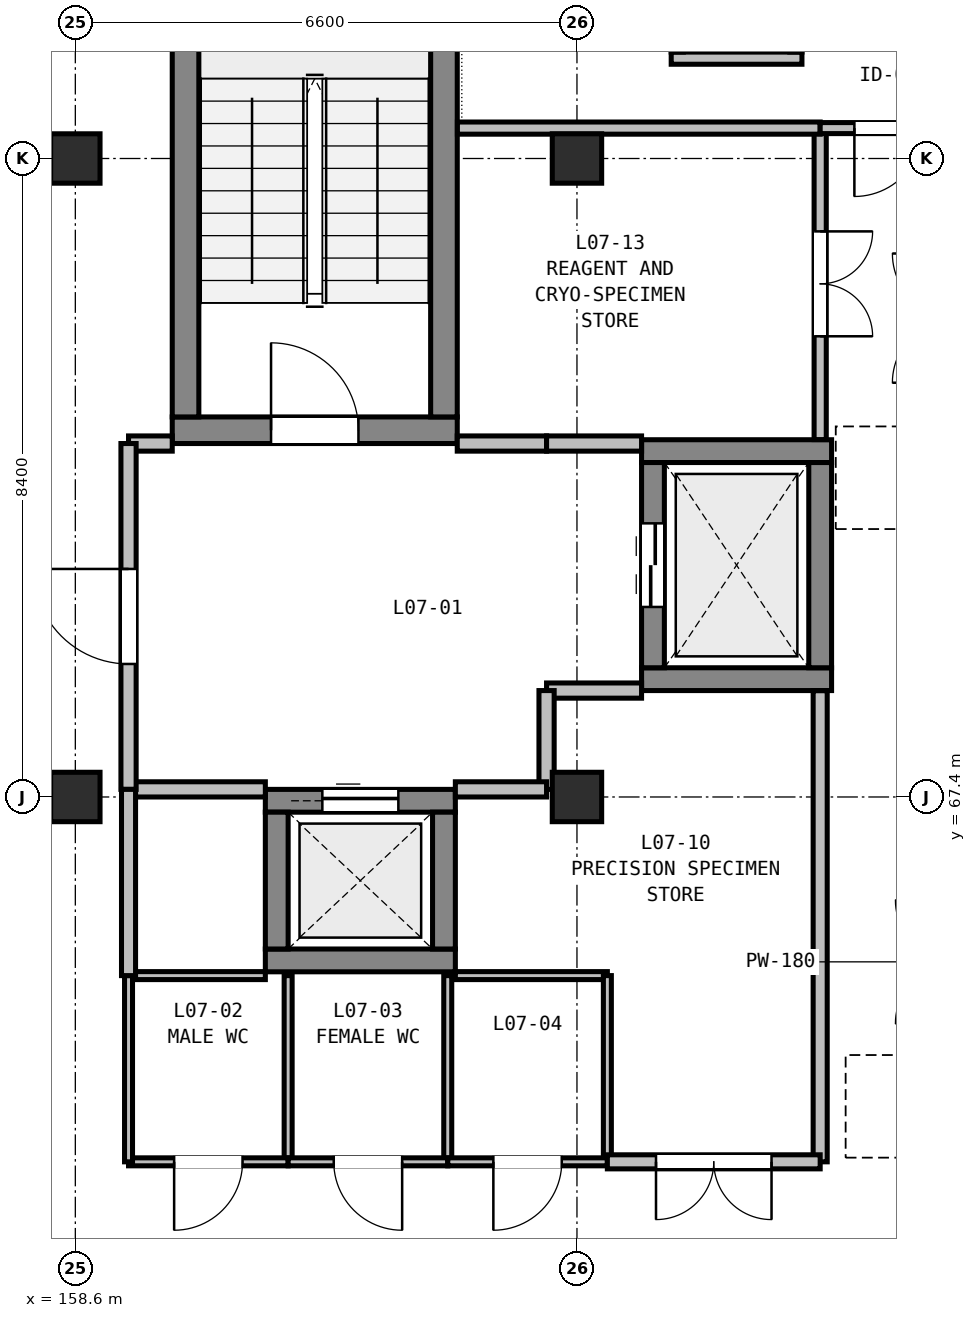
"""IFC4 building model, lengths in metres.
Left out: names, types, materials, properties, quantities, classifications, styles, units other than length and angle.
Written with IfcOpenShell. Run it as: python <this file> out.ifc"""

import sys

from ifc_helpers import new_model, si_unit, direction, frame, frame_2d, origin, origin_2d, place, context, subcontext, project, spatial, rectangle, extrude, element, fill, save


model = new_model("IFC4")
c1 = context("Model", 3, precision=1e-05, world=origin(), true_north=direction((0.0, 1.0)))
c2 = subcontext(c1, "Body", "Model", "MODEL_VIEW")
j1 = project(units=[si_unit("LENGTHUNIT", "METRE"), si_unit("PLANEANGLEUNIT", "RADIAN")], contexts=[c1])
p1 = place(None, origin())
s1 = spatial("IfcSite", under=j1, at=p1, CompositionType="ELEMENT")
p2 = place(p1, origin())
s2 = spatial("IfcBuilding", under=s1, at=p2, CompositionType="ELEMENT")
p3 = place(p2, frame((0.0, 0.0, 32.7)))
s3 = spatial("IfcBuildingStorey", under=s2, at=p3, CompositionType="ELEMENT", Elevation=32.7)
for number, where, z_axis, x_axis in (
    (1, (158.6, 67.4, 0.0), (0.0, 0.0, 1.0), (1.0, 0.0, 0.0)),
    (2, (158.6, 75.8, 0.0), (0.0, 0.0, 1.0), (1.0, 0.0, 0.0)),
    (3, (165.2, 67.4, 0.0), (0.0, 0.0, 1.0), (1.0, 0.0, 0.0)),
    (4, (165.2, 75.8, 0.0), (0.0, 0.0, 1.0), (1.0, 0.0, 0.0)),
):
    element("IfcColumn", number, at=place(p3, frame(where, z_axis=z_axis, x_axis=x_axis)), inside=s3, PredefinedType="COLUMN", context=c2, shape_type="SweptSolid", body=[
        extrude(rectangle(XDim=0.65, YDim=0.65, at=origin_2d()), origin(), (0.0, 0.0, 1.0), 3.9),
    ])
p4 = place(p3, frame((159.875, 72.225, 0.0), z_axis=(0.0, 0.0, 1.0), x_axis=(1.0, 0.0, 0.0)))
e5 = element("IfcWall", 5, at=p4, inside=s3, PredefinedType="SHEAR", context=c2, shape_type="SweptSolid", body=[
    extrude(rectangle(XDim=3.75, YDim=0.35, at=frame_2d((1.875, 0.0))), origin(), (0.0, 0.0, 1.0), 3.9),
])
p5 = place(p4, frame((1.3, 0.0, 0.0)))
e6 = element("IfcOpeningElement", 6, at=p5, cuts=e5, PredefinedType="OPENING", context=c2, shape_type="SweptSolid", body=[
    extrude(rectangle(XDim=1.15, YDim=2.15, at=frame_2d((0.575, 1.075))), frame((0.0, 0.185, 0.0), z_axis=(0.0, -1.0, 0.0), x_axis=(1.0, 0.0, 0.0)), (0.0, 0.0, 1.0), 0.37),
])
for number, where, z_axis, x_axis in (
    (7, (160.05, 72.4, 0.0), (0.0, 0.0, 1.0), (0.0, 1.0, 0.0)),
    (8, (163.45, 72.4, 0.0), (0.0, 0.0, 1.0), (0.0, 1.0, 0.0)),
):
    element("IfcWall", number, at=place(p3, frame(where, z_axis=z_axis, x_axis=x_axis)), inside=s3, PredefinedType="SHEAR", context=c2, shape_type="SweptSolid", body=[
        extrude(rectangle(XDim=7.375, YDim=0.35, at=frame_2d((3.688, 0.0))), origin(), (0.0, 0.0, 1.0), 3.9),
    ])
for number, where, z_axis, x_axis in (
    (9, (166.05, 68.95, 0.0), (0.0, 0.0, 1.0), (1.0, 0.0, 0.0)),
    (10, (166.05, 71.95, 0.0), (0.0, 0.0, 1.0), (1.0, 0.0, 0.0)),
):
    element("IfcWall", number, at=place(p3, frame(where, z_axis=z_axis, x_axis=x_axis)), inside=s3, PredefinedType="SHEAR", context=c2, shape_type="SweptSolid", body=[
        extrude(rectangle(XDim=2.5, YDim=0.3, at=frame_2d((1.25, 0.0))), origin(), (0.0, 0.0, 1.0), 3.9),
    ])
p6 = place(p3, frame((166.2, 69.1, 0.0), z_axis=(0.0, 0.0, 1.0), x_axis=(0.0, 1.0, 0.0)))
e11 = element("IfcWall", 11, at=p6, inside=s3, PredefinedType="SHEAR", context=c2, shape_type="SweptSolid", body=[
    extrude(rectangle(XDim=2.7, YDim=0.3, at=frame_2d((1.35, 0.0))), origin(), (0.0, 0.0, 1.0), 3.9),
])
p7 = place(p6, frame((0.8, 0.0, 0.0)))
e12 = element("IfcOpeningElement", 12, at=p7, cuts=e11, PredefinedType="OPENING", context=c2, shape_type="SweptSolid", body=[
    extrude(rectangle(XDim=1.1, YDim=2.1, at=frame_2d((0.55, 1.05))), frame((0.0, 0.16, 0.0), z_axis=(0.0, -1.0, 0.0), x_axis=(1.0, 0.0, 0.0)), (0.0, 0.0, 1.0), 0.32),
])
p8 = place(p3, frame((168.4, 69.1, 0.0), z_axis=(0.0, 0.0, 1.0), x_axis=(0.0, 1.0, 0.0)))
e13 = element("IfcWall", 13, at=p8, inside=s3, PredefinedType="SHEAR", context=c2, shape_type="SweptSolid", body=[
    extrude(rectangle(XDim=2.7, YDim=0.3, at=frame_2d((1.35, 0.0))), origin(), (0.0, 0.0, 1.0), 3.9),
])
p9 = place(p3, frame((161.1, 65.25, 0.0), z_axis=(0.0, 0.0, 1.0), x_axis=(1.0, 0.0, 0.0)))
e14 = element("IfcWall", 14, at=p9, inside=s3, PredefinedType="SHEAR", context=c2, shape_type="SweptSolid", body=[
    extrude(rectangle(XDim=2.5, YDim=0.3, at=frame_2d((1.25, 0.0))), origin(), (0.0, 0.0, 1.0), 3.9),
])
p10 = place(p3, frame((161.1, 67.35, 0.0), z_axis=(0.0, 0.0, 1.0), x_axis=(1.0, 0.0, 0.0)))
e15 = element("IfcWall", 15, at=p10, inside=s3, PredefinedType="SHEAR", context=c2, shape_type="SweptSolid", body=[
    extrude(rectangle(XDim=2.5, YDim=0.3, at=frame_2d((1.25, 0.0))), origin(), (0.0, 0.0, 1.0), 3.9),
])
p11 = place(p10, frame((0.75, 0.0, 0.0)))
e16 = element("IfcOpeningElement", 16, at=p11, cuts=e15, PredefinedType="OPENING", context=c2, shape_type="SweptSolid", body=[
    extrude(rectangle(XDim=1.0, YDim=2.1, at=frame_2d((0.5, 1.05))), frame((0.0, 0.16, 0.0), z_axis=(0.0, -1.0, 0.0), x_axis=(1.0, 0.0, 0.0)), (0.0, 0.0, 1.0), 0.32),
])
for number, where, z_axis, x_axis in (
    (17, (161.25, 65.4, 0.0), (0.0, 0.0, 1.0), (0.0, 1.0, 0.0)),
    (18, (163.45, 65.4, 0.0), (0.0, 0.0, 1.0), (0.0, 1.0, 0.0)),
):
    element("IfcWall", number, at=place(p3, frame(where, z_axis=z_axis, x_axis=x_axis)), inside=s3, PredefinedType="SHEAR", context=c2, shape_type="SweptSolid", body=[
        extrude(rectangle(XDim=1.8, YDim=0.3, at=frame_2d((0.9, 0.0))), origin(), (0.0, 0.0, 1.0), 3.9),
    ])
p12 = place(p3, frame((166.44, 77.12, 0.0), z_axis=(0.0, 0.0, 1.0), x_axis=(1.0, 0.0, 0.0)))
e19 = element("IfcWall", 19, at=p12, inside=s3, PredefinedType="PARTITIONING", context=c2, shape_type="SweptSolid", body=[
    extrude(rectangle(XDim=1.72, YDim=0.16, at=frame_2d((0.86, 0.0))), origin(), (0.0, 0.0, 1.0), 3.635),
])
p13 = place(p3, frame((159.3, 72.05, 0.0), z_axis=(0.0, 0.0, 1.0), x_axis=(1.0, 0.0, 0.0)))
e20 = element("IfcWall", 20, at=p13, inside=s3, PredefinedType="PARTITIONING", context=c2, shape_type="SweptSolid", body=[
    extrude(rectangle(XDim=0.575, YDim=0.2, at=frame_2d((0.288, 0.0))), origin(), (0.0, 0.0, 1.0), 3.635),
])
p14 = place(p3, frame((163.625, 72.05, 0.0), z_axis=(0.0, 0.0, 1.0), x_axis=(1.0, 0.0, 0.0)))
e21 = element("IfcWall", 21, at=p14, inside=s3, PredefinedType="PARTITIONING", context=c2, shape_type="SweptSolid", body=[
    extrude(rectangle(XDim=1.175, YDim=0.2, at=frame_2d((0.587, 0.0))), origin(), (0.0, 0.0, 1.0), 3.635),
])
for number, where, z_axis, x_axis in (
    (22, (164.8, 72.05, 0.0), (0.0, 0.0, 1.0), (1.0, 0.0, 0.0)),
    (23, (166.05, 68.8, 0.0), (0.0, 0.0, 1.0), (-1.0, 0.0, 0.0)),
):
    element("IfcWall", number, at=place(p3, frame(where, z_axis=z_axis, x_axis=x_axis)), inside=s3, PredefinedType="PARTITIONING", context=c2, shape_type="SweptSolid", body=[
        extrude(rectangle(XDim=1.25, YDim=0.2, at=frame_2d((0.625, 0.0))), origin(), (0.0, 0.0, 1.0), 3.185),
    ])
p15 = place(p3, frame((164.8, 68.8, 0.0), z_axis=(0.0, 0.0, 1.0), x_axis=(0.0, -1.0, 0.0)))
e24 = element("IfcWall", 24, at=p15, inside=s3, PredefinedType="PARTITIONING", context=c2, shape_type="SweptSolid", body=[
    extrude(rectangle(XDim=1.3, YDim=0.2, at=frame_2d((0.65, 0.0))), origin(), (0.0, 0.0, 1.0), 3.285),
])
p16 = place(p3, frame((164.8, 67.5, 0.0), z_axis=(0.0, 0.0, 1.0), x_axis=(-1.0, 0.0, 0.0)))
e25 = element("IfcWall", 25, at=p16, inside=s3, PredefinedType="PARTITIONING", context=c2, shape_type="SweptSolid", body=[
    extrude(rectangle(XDim=1.2, YDim=0.2, at=frame_2d((0.6, 0.0))), origin(), (0.0, 0.0, 1.0), 3.285),
])
p17 = place(p3, frame((161.1, 67.5, 0.0), z_axis=(0.0, 0.0, 1.0), x_axis=(-1.0, 0.0, 0.0)))
e26 = element("IfcWall", 26, at=p17, inside=s3, PredefinedType="PARTITIONING", context=c2, shape_type="SweptSolid", body=[
    extrude(rectangle(XDim=1.8, YDim=0.2, at=frame_2d((0.9, 0.0))), origin(), (0.0, 0.0, 1.0), 3.285),
])
p18 = place(p3, frame((159.3, 67.5, 0.0), z_axis=(0.0, 0.0, 1.0), x_axis=(0.0, 1.0, 0.0)))
e27 = element("IfcWall", 27, at=p18, inside=s3, PredefinedType="PARTITIONING", context=c2, shape_type="SweptSolid", body=[
    extrude(rectangle(XDim=4.55, YDim=0.2, at=frame_2d((2.275, 0.0))), origin(), (0.0, 0.0, 1.0), 3.285),
])
p19 = place(p18, frame((1.65, 0.0, 0.0)))
e28 = element("IfcOpeningElement", 28, at=p19, cuts=e27, PredefinedType="OPENING", context=c2, shape_type="SweptSolid", body=[
    extrude(rectangle(XDim=1.25, YDim=2.15, at=frame_2d((0.625, 1.075))), frame((0.0, 0.11, 0.0), z_axis=(0.0, -1.0, 0.0), x_axis=(1.0, 0.0, 0.0)), (0.0, 0.0, 1.0), 0.22),
])
p20 = place(p3, frame((159.3, 65.05, 0.0), z_axis=(0.0, 0.0, 1.0), x_axis=(1.0, 0.0, 0.0)))
e29 = element("IfcWall", 29, at=p20, inside=s3, PredefinedType="PARTITIONING", context=c2, shape_type="SweptSolid", body=[
    extrude(rectangle(XDim=1.8, YDim=0.105, at=frame_2d((0.9, 0.0))), origin(), (0.0, 0.0, 1.0), 3.635),
])
p21 = place(p3, frame((161.4, 65.05, 0.0), z_axis=(0.0, 0.0, 1.0), x_axis=(0.0, -1.0, 0.0)))
e30 = element("IfcWall", 30, at=p21, inside=s3, PredefinedType="PARTITIONING", context=c2, shape_type="SweptSolid", body=[
    extrude(rectangle(XDim=2.45, YDim=0.105, at=frame_2d((1.225, 0.0))), origin(), (0.0, 0.0, 1.0), 3.635),
])
p22 = place(p3, frame((161.4, 62.6, 0.0), z_axis=(0.0, 0.0, 1.0), x_axis=(-1.0, 0.0, 0.0)))
e31 = element("IfcWall", 31, at=p22, inside=s3, PredefinedType="PARTITIONING", context=c2, shape_type="SweptSolid", body=[
    extrude(rectangle(XDim=2.1, YDim=0.105, at=frame_2d((1.05, 0.0))), origin(), (0.0, 0.0, 1.0), 3.635),
])
p23 = place(p22, frame((0.6, 0.0, 0.0)))
e32 = element("IfcOpeningElement", 32, at=p23, cuts=e31, PredefinedType="OPENING", context=c2, shape_type="SweptSolid", body=[
    extrude(rectangle(XDim=0.9, YDim=2.02, at=frame_2d((0.45, 1.01))), frame((0.0, 0.062, 0.0), z_axis=(0.0, -1.0, 0.0), x_axis=(1.0, 0.0, 0.0)), (0.0, 0.0, 1.0), 0.125),
])
for number, where, z_axis, x_axis in (
    (33, (159.3, 62.6, 0.0), (0.0, 0.0, 1.0), (0.0, 1.0, 0.0)),
    (34, (163.5, 65.05, 0.0), (0.0, 0.0, 1.0), (0.0, -1.0, 0.0)),
):
    element("IfcWall", number, at=place(p3, frame(where, z_axis=z_axis, x_axis=x_axis)), inside=s3, PredefinedType="PARTITIONING", context=c2, shape_type="SweptSolid", body=[
        extrude(rectangle(XDim=2.45, YDim=0.105, at=frame_2d((1.225, 0.0))), origin(), (0.0, 0.0, 1.0), 3.635),
    ])
p24 = place(p3, frame((163.5, 62.6, 0.0), z_axis=(0.0, 0.0, 1.0), x_axis=(-1.0, 0.0, 0.0)))
e35 = element("IfcWall", 35, at=p24, inside=s3, PredefinedType="PARTITIONING", context=c2, shape_type="SweptSolid", body=[
    extrude(rectangle(XDim=2.1, YDim=0.105, at=frame_2d((1.05, 0.0))), origin(), (0.0, 0.0, 1.0), 3.635),
])
p25 = place(p24, frame((0.6, 0.0, 0.0)))
e36 = element("IfcOpeningElement", 36, at=p25, cuts=e35, PredefinedType="OPENING", context=c2, shape_type="SweptSolid", body=[
    extrude(rectangle(XDim=0.9, YDim=2.02, at=frame_2d((0.45, 1.01))), frame((0.0, 0.062, 0.0), z_axis=(0.0, -1.0, 0.0), x_axis=(1.0, 0.0, 0.0)), (0.0, 0.0, 1.0), 0.125),
])
p26 = place(p3, frame((163.6, 65.05, 0.0), z_axis=(0.0, 0.0, 1.0), x_axis=(1.0, 0.0, 0.0)))
e37 = element("IfcWall", 37, at=p26, inside=s3, PredefinedType="PARTITIONING", context=c2, shape_type="SweptSolid", body=[
    extrude(rectangle(XDim=2.0, YDim=0.105, at=frame_2d((1.0, 0.0))), origin(), (0.0, 0.0, 1.0), 3.185),
])
p27 = place(p3, frame((165.6, 65.05, 0.0), z_axis=(0.0, 0.0, 1.0), x_axis=(0.0, -1.0, 0.0)))
e38 = element("IfcWall", 38, at=p27, inside=s3, PredefinedType="PARTITIONING", context=c2, shape_type="SweptSolid", body=[
    extrude(rectangle(XDim=2.45, YDim=0.105, at=frame_2d((1.225, 0.0))), origin(), (0.0, 0.0, 1.0), 3.635),
])
p28 = place(p3, frame((165.6, 62.6, 0.0), z_axis=(0.0, 0.0, 1.0), x_axis=(-1.0, 0.0, 0.0)))
e39 = element("IfcWall", 39, at=p28, inside=s3, PredefinedType="PARTITIONING", context=c2, shape_type="SweptSolid", body=[
    extrude(rectangle(XDim=2.1, YDim=0.105, at=frame_2d((1.05, 0.0))), origin(), (0.0, 0.0, 1.0), 3.185),
])
p29 = place(p28, frame((0.6, 0.0, 0.0)))
e40 = element("IfcOpeningElement", 40, at=p29, cuts=e39, PredefinedType="OPENING", context=c2, shape_type="SweptSolid", body=[
    extrude(rectangle(XDim=0.9, YDim=2.02, at=frame_2d((0.45, 1.01))), frame((0.0, 0.062, 0.0), z_axis=(0.0, -1.0, 0.0), x_axis=(1.0, 0.0, 0.0)), (0.0, 0.0, 1.0), 0.125),
])
p30 = place(p3, frame((168.4, 68.798, 0.0), z_axis=(0.0, 0.0, 1.0), x_axis=(0.0, -1.0, 0.0)))
e41 = element("IfcWall", 41, at=p30, inside=s3, PredefinedType="PARTITIONING", context=c2, shape_type="SweptSolid", body=[
    extrude(rectangle(XDim=6.198, YDim=0.185, at=frame_2d((3.099, 0.0))), origin(), (0.0, 0.0, 1.0), 3.285),
])
p31 = place(p3, frame((168.4, 62.6, 0.0), z_axis=(0.0, 0.0, 1.0), x_axis=(-1.0, 0.0, 0.0)))
e42 = element("IfcWall", 42, at=p31, inside=s3, PredefinedType="PARTITIONING", context=c2, shape_type="SweptSolid", body=[
    extrude(rectangle(XDim=2.8, YDim=0.185, at=frame_2d((1.4, 0.0))), origin(), (0.0, 0.0, 1.0), 3.435),
])
p32 = place(p31, frame((0.64, 0.0, 0.0)))
e43 = element("IfcOpeningElement", 43, at=p32, cuts=e42, PredefinedType="OPENING", context=c2, shape_type="SweptSolid", body=[
    extrude(rectangle(XDim=1.52, YDim=2.14, at=frame_2d((0.76, 1.07))), frame((0.0, 0.103, 0.0), z_axis=(0.0, -1.0, 0.0), x_axis=(1.0, 0.0, 0.0)), (0.0, 0.0, 1.0), 0.205),
])
p33 = place(p3, frame((159.3, 65.05, 0.0), z_axis=(0.0, 0.0, 1.0), x_axis=(0.0, 1.0, 0.0)))
e44 = element("IfcWall", 44, at=p33, inside=s3, PredefinedType="PARTITIONING", context=c2, shape_type="SweptSolid", body=[
    extrude(rectangle(XDim=2.45, YDim=0.185, at=frame_2d((1.225, 0.0))), origin(), (0.0, 0.0, 1.0), 3.285),
])
p34 = place(p3, frame((168.4, 76.2, 0.0), z_axis=(0.0, 0.0, 1.0), x_axis=(0.0, -1.0, 0.0)))
e45 = element("IfcWall", 45, at=p34, inside=s3, PredefinedType="PARTITIONING", context=c2, shape_type="SweptSolid", body=[
    extrude(rectangle(XDim=4.098, YDim=0.16, at=frame_2d((2.049, 0.0))), origin(), (0.0, 0.0, 1.0), 3.285),
])
p35 = place(p34, frame((1.359, 0.0, 0.0)))
e46 = element("IfcOpeningElement", 46, at=p35, cuts=e45, PredefinedType="OPENING", context=c2, shape_type="SweptSolid", body=[
    extrude(rectangle(XDim=1.38, YDim=2.2, at=frame_2d((0.69, 1.1))), frame((0.0, 0.09, 0.0), z_axis=(0.0, -1.0, 0.0), x_axis=(1.0, 0.0, 0.0)), (0.0, 0.0, 1.0), 0.18),
])
p36 = place(p3, frame((163.627, 76.2, 0.0), z_axis=(0.0, 0.0, 1.0), x_axis=(1.0, 0.0, 0.0)))
e47 = element("IfcWall", 47, at=p36, inside=s3, PredefinedType="PARTITIONING", context=c2, shape_type="SweptSolid", body=[
    extrude(rectangle(XDim=4.773, YDim=0.16, at=frame_2d((2.386, 0.0))), origin(), (0.0, 0.0, 1.0), 3.185),
])
p37 = place(p3, frame((170.2, 76.2, 0.0), z_axis=(0.0, 0.0, 1.0), x_axis=(-1.0, 0.0, 0.0)))
e48 = element("IfcWall", 48, at=p37, inside=s3, PredefinedType="PARTITIONING", context=c2, shape_type="SweptSolid", body=[
    extrude(rectangle(XDim=1.8, YDim=0.145, at=frame_2d((0.9, 0.0))), origin(), (0.0, 0.0, 1.0), 3.435),
])
p38 = place(p37, frame((0.45, 0.0, 0.0)))
e49 = element("IfcOpeningElement", 49, at=p38, cuts=e48, PredefinedType="OPENING", context=c2, shape_type="SweptSolid", body=[
    extrude(rectangle(XDim=0.9, YDim=2.02, at=frame_2d((0.45, 1.01))), frame((0.0, 0.083, 0.0), z_axis=(0.0, -1.0, 0.0), x_axis=(1.0, 0.0, 0.0)), (0.0, 0.0, 1.0), 0.165),
])
p39 = place(p5, origin())
e50 = element("IfcDoor", 50, at=p39, inside=s3, OperationType="SINGLE_SWING_LEFT", PredefinedType="DOOR", context=c2, shape_type="SweptSolid", body=[
    extrude(rectangle(XDim=1.15, YDim=2.15, at=frame_2d((0.575, 1.075))), frame((0.0, 0.025, 0.0), z_axis=(0.0, -1.0, 0.0), x_axis=(1.0, 0.0, 0.0)), (0.0, 0.0, 1.0), 0.05),
])
fill(e6, e50)
p40 = place(p7, origin())
e51 = element("IfcDoor", 51, at=p40, inside=s3, OperationType="DOUBLE_DOOR_SLIDING", PredefinedType="DOOR", context=c2, shape_type="SweptSolid", body=[
    extrude(rectangle(XDim=1.1, YDim=2.1, at=frame_2d((0.55, 1.05))), frame((0.0, 0.025, 0.0), z_axis=(0.0, -1.0, 0.0), x_axis=(1.0, 0.0, 0.0)), (0.0, 0.0, 1.0), 0.05),
])
fill(e12, e51)
p41 = place(p11, origin())
e52 = element("IfcDoor", 52, at=p41, inside=s3, OperationType="SLIDING_TO_LEFT", PredefinedType="DOOR", context=c2, shape_type="SweptSolid", body=[
    extrude(rectangle(XDim=1.0, YDim=2.1, at=frame_2d((0.5, 1.05))), frame((0.0, 0.025, 0.0), z_axis=(0.0, -1.0, 0.0), x_axis=(1.0, 0.0, 0.0)), (0.0, 0.0, 1.0), 0.05),
])
fill(e16, e52)
p42 = place(p19, origin())
e53 = element("IfcDoor", 53, at=p42, inside=s3, OperationType="SINGLE_SWING_RIGHT", PredefinedType="DOOR", context=c2, shape_type="SweptSolid", body=[
    extrude(rectangle(XDim=1.25, YDim=2.15, at=frame_2d((0.625, 1.075))), frame((0.0, 0.025, 0.0), z_axis=(0.0, -1.0, 0.0), x_axis=(1.0, 0.0, 0.0)), (0.0, 0.0, 1.0), 0.05),
])
fill(e28, e53)
p43 = place(p23, origin())
e54 = element("IfcDoor", 54, at=p43, inside=s3, OperationType="SINGLE_SWING_RIGHT", PredefinedType="DOOR", context=c2, shape_type="SweptSolid", body=[
    extrude(rectangle(XDim=0.9, YDim=2.02, at=frame_2d((0.45, 1.01))), frame((0.0, 0.025, 0.0), z_axis=(0.0, -1.0, 0.0), x_axis=(1.0, 0.0, 0.0)), (0.0, 0.0, 1.0), 0.05),
])
fill(e32, e54)
p44 = place(p25, origin())
e55 = element("IfcDoor", 55, at=p44, inside=s3, OperationType="SINGLE_SWING_LEFT", PredefinedType="DOOR", context=c2, shape_type="SweptSolid", body=[
    extrude(rectangle(XDim=0.9, YDim=2.02, at=frame_2d((0.45, 1.01))), frame((0.0, 0.025, 0.0), z_axis=(0.0, -1.0, 0.0), x_axis=(1.0, 0.0, 0.0)), (0.0, 0.0, 1.0), 0.05),
])
fill(e36, e55)
p45 = place(p29, origin())
e56 = element("IfcDoor", 56, at=p45, inside=s3, OperationType="SINGLE_SWING_RIGHT", PredefinedType="DOOR", context=c2, shape_type="SweptSolid", body=[
    extrude(rectangle(XDim=0.9, YDim=2.02, at=frame_2d((0.45, 1.01))), frame((0.0, 0.025, 0.0), z_axis=(0.0, -1.0, 0.0), x_axis=(1.0, 0.0, 0.0)), (0.0, 0.0, 1.0), 0.05),
])
fill(e40, e56)
p46 = place(p32, origin())
e57 = element("IfcDoor", 57, at=p46, inside=s3, OperationType="DOUBLE_DOOR_SINGLE_SWING", PredefinedType="DOOR", context=c2, shape_type="SweptSolid", body=[
    extrude(rectangle(XDim=1.52, YDim=2.14, at=frame_2d((0.76, 1.07))), frame((0.0, 0.025, 0.0), z_axis=(0.0, -1.0, 0.0), x_axis=(1.0, 0.0, 0.0)), (0.0, 0.0, 1.0), 0.05),
])
fill(e43, e57)
p47 = place(p35, origin())
e58 = element("IfcDoor", 58, at=p47, inside=s3, OperationType="DOUBLE_DOOR_SINGLE_SWING", PredefinedType="DOOR", context=c2, shape_type="SweptSolid", body=[
    extrude(rectangle(XDim=1.38, YDim=2.2, at=frame_2d((0.69, 1.1))), frame((0.0, 0.025, 0.0), z_axis=(0.0, -1.0, 0.0), x_axis=(1.0, 0.0, 0.0)), (0.0, 0.0, 1.0), 0.05),
])
fill(e46, e58)
p48 = place(p38, origin())
e59 = element("IfcDoor", 59, at=p48, inside=s3, OperationType="SINGLE_SWING_RIGHT", PredefinedType="DOOR", context=c2, shape_type="SweptSolid", body=[
    extrude(rectangle(XDim=0.9, YDim=2.02, at=frame_2d((0.45, 1.01))), frame((0.0, 0.025, 0.0), z_axis=(0.0, -1.0, 0.0), x_axis=(1.0, 0.0, 0.0)), (0.0, 0.0, 1.0), 0.05),
])
fill(e49, e59)
save(model, sys.argv[1])
